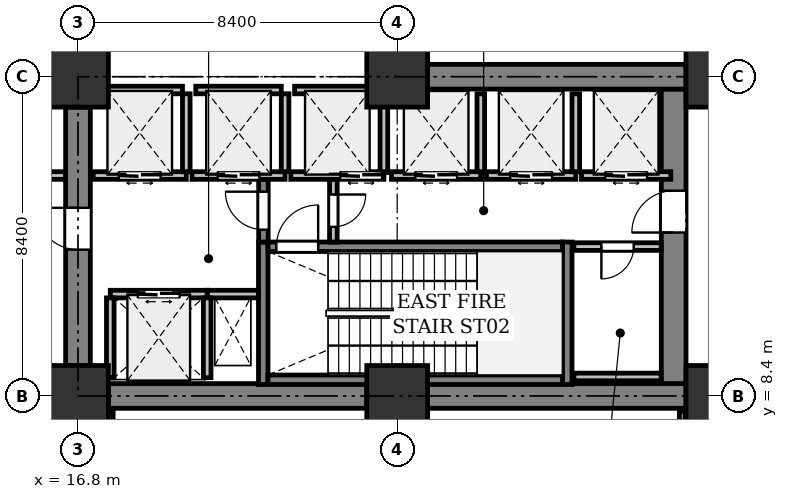
"""IFC4 building model, lengths in metres.
Left out: names, types, materials, properties, quantities, classifications, styles, units other than length and angle.
Written with IfcOpenShell. Run it as: python <this file> out.ifc"""

import sys

from ifc_helpers import new_model, si_unit, direction, frame, frame_2d, origin, origin_2d, place, context, subcontext, project, spatial, rectangle, extrude, element, fill, save


model = new_model("IFC4")
c1 = context("Model", 3, precision=1e-05, world=origin(), true_north=direction((0.0, 1.0)))
c2 = subcontext(c1, "Body", "Model", "MODEL_VIEW")
j1 = project(units=[si_unit("LENGTHUNIT", "METRE"), si_unit("PLANEANGLEUNIT", "RADIAN")], contexts=[c1])
p1 = place(None, origin())
s1 = spatial("IfcSite", under=j1, at=p1, CompositionType="ELEMENT")
p2 = place(p1, origin())
s2 = spatial("IfcBuilding", under=s1, at=p2, CompositionType="ELEMENT")
p3 = place(p2, origin())
s3 = spatial("IfcBuildingStorey", under=s2, at=p3, CompositionType="ELEMENT", Elevation=0.0)
for number, where, z_axis, x_axis in (
    (1, (16.8, 8.4, 0.0), (0.0, 0.0, 1.0), (1.0, 0.0, 0.0)),
    (2, (16.8, 16.8, 0.0), (0.0, 0.0, 1.0), (1.0, 0.0, 0.0)),
    (3, (25.2, 8.4, 0.0), (0.0, 0.0, 1.0), (1.0, 0.0, 0.0)),
    (4, (25.2, 16.8, 0.0), (0.0, 0.0, 1.0), (1.0, 0.0, 0.0)),
    (5, (33.6, 8.4, 0.0), (0.0, 0.0, 1.0), (1.0, 0.0, 0.0)),
    (6, (33.6, 16.8, 0.0), (0.0, 0.0, 1.0), (1.0, 0.0, 0.0)),
):
    element("IfcColumn", number, at=place(p3, frame(where, z_axis=z_axis, x_axis=x_axis)), inside=s3, PredefinedType="COLUMN", context=c2, shape_type="SweptSolid", body=[
        extrude(rectangle(XDim=1.6, YDim=1.6, at=origin_2d()), origin(), (0.0, 0.0, 1.0), 5.4),
    ])
p4 = place(p3, frame((17.6, 8.4, 0.0), z_axis=(0.0, 0.0, 1.0), x_axis=(1.0, 0.0, 0.0)))
e7 = element("IfcWall", 7, at=p4, inside=s3, PredefinedType="SHEAR", context=c2, shape_type="SweptSolid", body=[
    extrude(rectangle(XDim=6.8, YDim=0.65, at=frame_2d((3.4, 0.0))), origin(), (0.0, 0.0, 1.0), 5.125),
])
p5 = place(p3, frame((26.0, 8.4, 0.0), z_axis=(0.0, 0.0, 1.0), x_axis=(1.0, 0.0, 0.0)))
e8 = element("IfcWall", 8, at=p5, inside=s3, PredefinedType="SHEAR", context=c2, shape_type="SweptSolid", body=[
    extrude(rectangle(XDim=6.8, YDim=0.65, at=frame_2d((3.4, 0.0))), origin(), (0.0, 0.0, 1.0), 5.125),
])
p6 = place(p3, frame((32.475, 8.725, 0.0), z_axis=(0.0, 0.0, 1.0), x_axis=(0.0, 1.0, 0.0)))
e9 = element("IfcWall", 9, at=p6, inside=s3, PredefinedType="SHEAR", context=c2, shape_type="SweptSolid", body=[
    extrude(rectangle(XDim=7.75, YDim=0.65, at=frame_2d((3.875, 0.0))), origin(), (0.0, 0.0, 1.0), 5.125),
])
p7 = place(p6, frame((3.975, 0.0, 0.0)))
e10 = element("IfcOpeningElement", 10, at=p7, cuts=e9, PredefinedType="OPENING", context=c2, shape_type="SweptSolid", body=[
    extrude(rectangle(XDim=1.1, YDim=2.15, at=frame_2d((0.55, 1.075))), frame((0.0, 0.335, 0.0), z_axis=(0.0, -1.0, 0.0), x_axis=(1.0, 0.0, 0.0)), (0.0, 0.0, 1.0), 0.67),
])
p8 = place(p3, frame((16.8, 9.2, 0.0), z_axis=(0.0, 0.0, 1.0), x_axis=(0.0, 1.0, 0.0)))
e11 = element("IfcWall", 11, at=p8, inside=s3, PredefinedType="SHEAR", context=c2, shape_type="SweptSolid", body=[
    extrude(rectangle(XDim=6.8, YDim=0.65, at=frame_2d((3.4, 0.0))), origin(), (0.0, 0.0, 1.0), 5.125),
])
p9 = place(p8, frame((3.05, 0.0, 0.0)))
e12 = element("IfcOpeningElement", 12, at=p9, cuts=e11, PredefinedType="OPENING", context=c2, shape_type="SweptSolid", body=[
    extrude(rectangle(XDim=1.1, YDim=2.15, at=frame_2d((0.55, 1.075))), frame((0.0, 0.335, 0.0), z_axis=(0.0, -1.0, 0.0), x_axis=(1.0, 0.0, 0.0)), (0.0, 0.0, 1.0), 0.67),
])
p10 = place(p3, frame((26.0, 16.8, 0.0), z_axis=(0.0, 0.0, 1.0), x_axis=(1.0, 0.0, 0.0)))
e13 = element("IfcWall", 13, at=p10, inside=s3, PredefinedType="SHEAR", context=c2, shape_type="SweptSolid", body=[
    extrude(rectangle(XDim=6.8, YDim=0.65, at=frame_2d((3.4, 0.0))), origin(), (0.0, 0.0, 1.0), 5.125),
])
for number, where, z_axis, x_axis in (
    (14, (21.675, 8.7, 0.0), (0.0, 0.0, 1.0), (0.0, 1.0, 0.0)),
    (15, (29.675, 8.7, 0.0), (0.0, 0.0, 1.0), (0.0, 1.0, 0.0)),
):
    element("IfcWall", number, at=place(p3, frame(where, z_axis=z_axis, x_axis=x_axis)), inside=s3, PredefinedType="SHEAR", context=c2, shape_type="SweptSolid", body=[
        extrude(rectangle(XDim=3.75, YDim=0.25, at=frame_2d((1.875, 0.0))), origin(), (0.0, 0.0, 1.0), 5.125),
    ])
p11 = place(p3, frame((21.8, 8.825, 0.0), z_axis=(0.0, 0.0, 1.0), x_axis=(1.0, 0.0, 0.0)))
e16 = element("IfcWall", 16, at=p11, inside=s3, PredefinedType="SHEAR", context=c2, shape_type="SweptSolid", body=[
    extrude(rectangle(XDim=7.75, YDim=0.25, at=frame_2d((3.875, 0.0))), origin(), (0.0, 0.0, 1.0), 5.125),
])
p12 = place(p3, frame((21.8, 12.325, 0.0), z_axis=(0.0, 0.0, 1.0), x_axis=(1.0, 0.0, 0.0)))
e17 = element("IfcWall", 17, at=p12, inside=s3, PredefinedType="SHEAR", context=c2, shape_type="SweptSolid", body=[
    extrude(rectangle(XDim=7.75, YDim=0.25, at=frame_2d((3.875, 0.0))), origin(), (0.0, 0.0, 1.0), 5.125),
])
p13 = place(p12, frame((0.22, 0.0, 0.0)))
e18 = element("IfcOpeningElement", 18, at=p13, cuts=e17, PredefinedType="OPENING", context=c2, shape_type="SweptSolid", body=[
    extrude(rectangle(XDim=1.1, YDim=2.15, at=frame_2d((0.55, 1.075))), frame((0.0, 0.135, 0.0), z_axis=(0.0, -1.0, 0.0), x_axis=(1.0, 0.0, 0.0)), (0.0, 0.0, 1.0), 0.27),
])
p14 = place(p3, frame((20.2, 11.08, 0.0), z_axis=(0.0, 0.0, 1.0), x_axis=(1.0, 0.0, 0.0)))
e19 = element("IfcWall", 19, at=p14, inside=s3, PredefinedType="PARTITIONING", context=c2, shape_type="SweptSolid", body=[
    extrude(rectangle(XDim=1.35, YDim=0.2, at=frame_2d((0.675, 0.0))), origin(), (0.0, 0.0, 1.0), 5.125),
])
p15 = place(p3, frame((21.68, 12.45, 0.0), z_axis=(0.0, 0.0, 1.0), x_axis=(0.0, 1.0, 0.0)))
e20 = element("IfcWall", 20, at=p15, inside=s3, PredefinedType="SHEAR", context=c2, shape_type="SweptSolid", body=[
    extrude(rectangle(XDim=1.65, YDim=0.25, at=frame_2d((0.825, 0.0))), origin(), (0.0, 0.0, 1.0), 5.125),
])
p16 = place(p15, frame((0.325, 0.0, 0.0)))
e21 = element("IfcOpeningElement", 21, at=p16, cuts=e20, PredefinedType="OPENING", context=c2, shape_type="SweptSolid", body=[
    extrude(rectangle(XDim=1.0, YDim=2.15, at=frame_2d((0.5, 1.075))), frame((0.0, 0.135, 0.0), z_axis=(0.0, -1.0, 0.0), x_axis=(1.0, 0.0, 0.0)), (0.0, 0.0, 1.0), 0.27),
])
p17 = place(p3, frame((23.52, 14.1, 0.0), z_axis=(0.0, 0.0, 1.0), x_axis=(0.0, -1.0, 0.0)))
e22 = element("IfcWall", 22, at=p17, inside=s3, PredefinedType="PARTITIONING", context=c2, shape_type="SweptSolid", body=[
    extrude(rectangle(XDim=1.65, YDim=0.2, at=frame_2d((0.825, 0.0))), origin(), (0.0, 0.0, 1.0), 5.125),
])
p18 = place(p17, frame((0.4, 0.0, 0.0)))
e23 = element("IfcOpeningElement", 23, at=p18, cuts=e22, PredefinedType="OPENING", context=c2, shape_type="SweptSolid", body=[
    extrude(rectangle(XDim=0.85, YDim=2.15, at=frame_2d((0.425, 1.075))), frame((0.0, 0.11, 0.0), z_axis=(0.0, -1.0, 0.0), x_axis=(1.0, 0.0, 0.0)), (0.0, 0.0, 1.0), 0.22),
])
p19 = place(p3, frame((17.65, 11.08, 0.0), z_axis=(0.0, 0.0, 1.0), x_axis=(1.0, 0.0, 0.0)))
e24 = element("IfcWall", 24, at=p19, inside=s3, PredefinedType="PARTITIONING", context=c2, shape_type="SweptSolid", body=[
    extrude(rectangle(XDim=2.55, YDim=0.2, at=frame_2d((1.275, 0.0))), origin(), (0.0, 0.0, 1.0), 5.125),
])
p20 = place(p19, frame((0.725, 0.0, 0.0)))
e25 = element("IfcOpeningElement", 25, at=p20, cuts=e24, PredefinedType="OPENING", context=c2, shape_type="SweptSolid", body=[
    extrude(rectangle(XDim=1.1, YDim=2.2, at=frame_2d((0.55, 1.1))), frame((0.0, 0.11, 0.0), z_axis=(0.0, -1.0, 0.0), x_axis=(1.0, 0.0, 0.0)), (0.0, 0.0, 1.0), 0.22),
])
for number, where, z_axis, x_axis in (
    (26, (20.2, 8.88, 0.0), (0.0, 0.0, 1.0), (0.0, 1.0, 0.0)),
    (27, (17.65, 8.88, 0.0), (0.0, 0.0, 1.0), (0.0, 1.0, 0.0)),
):
    element("IfcWall", number, at=place(p3, frame(where, z_axis=z_axis, x_axis=x_axis)), inside=s3, PredefinedType="PARTITIONING", context=c2, shape_type="SweptSolid", body=[
        extrude(rectangle(XDim=2.1, YDim=0.2, at=frame_2d((1.05, 0.0))), origin(), (0.0, 0.0, 1.0), 5.125),
    ])
p21 = place(p3, frame((17.2, 14.2, 0.0), z_axis=(0.0, 0.0, 1.0), x_axis=(1.0, 0.0, 0.0)))
e28 = element("IfcWall", 28, at=p21, inside=s3, PredefinedType="PARTITIONING", context=c2, shape_type="SweptSolid", body=[
    extrude(rectangle(XDim=2.45, YDim=0.2, at=frame_2d((1.225, 0.0))), origin(), (0.0, 0.0, 1.0), 5.125),
])
p22 = place(p21, frame((0.675, 0.0, 0.0)))
e29 = element("IfcOpeningElement", 29, at=p22, cuts=e28, PredefinedType="OPENING", context=c2, shape_type="SweptSolid", body=[
    extrude(rectangle(XDim=1.1, YDim=2.2, at=frame_2d((0.55, 1.1))), frame((0.0, 0.11, 0.0), z_axis=(0.0, -1.0, 0.0), x_axis=(1.0, 0.0, 0.0)), (0.0, 0.0, 1.0), 0.22),
])
p23 = place(p3, frame((19.65, 14.3, 0.0), z_axis=(0.0, 0.0, 1.0), x_axis=(0.0, 1.0, 0.0)))
e30 = element("IfcWall", 30, at=p23, inside=s3, PredefinedType="PARTITIONING", context=c2, shape_type="SweptSolid", body=[
    extrude(rectangle(XDim=2.05, YDim=0.2, at=frame_2d((1.025, 0.0))), origin(), (0.0, 0.0, 1.0), 5.125),
])
p24 = place(p3, frame((17.3, 16.45, 0.0), z_axis=(0.0, 0.0, 1.0), x_axis=(1.0, 0.0, 0.0)))
e31 = element("IfcWall", 31, at=p24, inside=s3, PredefinedType="PARTITIONING", context=c2, shape_type="SweptSolid", body=[
    extrude(rectangle(XDim=2.25, YDim=0.2, at=frame_2d((1.125, 0.0))), origin(), (0.0, 0.0, 1.0), 5.125),
])
p25 = place(p3, frame((19.8, 14.2, 0.0), z_axis=(0.0, 0.0, 1.0), x_axis=(1.0, 0.0, 0.0)))
e32 = element("IfcWall", 32, at=p25, inside=s3, PredefinedType="PARTITIONING", context=c2, shape_type="SweptSolid", body=[
    extrude(rectangle(XDim=2.45, YDim=0.2, at=frame_2d((1.225, 0.0))), origin(), (0.0, 0.0, 1.0), 5.125),
])
p26 = place(p25, frame((0.675, 0.0, 0.0)))
e33 = element("IfcOpeningElement", 33, at=p26, cuts=e32, PredefinedType="OPENING", context=c2, shape_type="SweptSolid", body=[
    extrude(rectangle(XDim=1.1, YDim=2.2, at=frame_2d((0.55, 1.1))), frame((0.0, 0.11, 0.0), z_axis=(0.0, -1.0, 0.0), x_axis=(1.0, 0.0, 0.0)), (0.0, 0.0, 1.0), 0.22),
])
p27 = place(p3, frame((22.25, 14.3, 0.0), z_axis=(0.0, 0.0, 1.0), x_axis=(0.0, 1.0, 0.0)))
e34 = element("IfcWall", 34, at=p27, inside=s3, PredefinedType="PARTITIONING", context=c2, shape_type="SweptSolid", body=[
    extrude(rectangle(XDim=2.05, YDim=0.2, at=frame_2d((1.025, 0.0))), origin(), (0.0, 0.0, 1.0), 5.125),
])
p28 = place(p3, frame((19.9, 16.45, 0.0), z_axis=(0.0, 0.0, 1.0), x_axis=(1.0, 0.0, 0.0)))
e35 = element("IfcWall", 35, at=p28, inside=s3, PredefinedType="PARTITIONING", context=c2, shape_type="SweptSolid", body=[
    extrude(rectangle(XDim=2.25, YDim=0.2, at=frame_2d((1.125, 0.0))), origin(), (0.0, 0.0, 1.0), 5.125),
])
p29 = place(p3, frame((22.4, 14.2, 0.0), z_axis=(0.0, 0.0, 1.0), x_axis=(1.0, 0.0, 0.0)))
e36 = element("IfcWall", 36, at=p29, inside=s3, PredefinedType="PARTITIONING", context=c2, shape_type="SweptSolid", body=[
    extrude(rectangle(XDim=2.45, YDim=0.2, at=frame_2d((1.225, 0.0))), origin(), (0.0, 0.0, 1.0), 5.125),
])
p30 = place(p29, frame((1.3, 0.0, 0.0)))
e37 = element("IfcOpeningElement", 37, at=p30, cuts=e36, PredefinedType="OPENING", context=c2, shape_type="SweptSolid", body=[
    extrude(rectangle(XDim=1.1, YDim=2.2, at=frame_2d((0.55, 1.1))), frame((0.0, 0.11, 0.0), z_axis=(0.0, -1.0, 0.0), x_axis=(1.0, 0.0, 0.0)), (0.0, 0.0, 1.0), 0.22),
])
p31 = place(p3, frame((24.85, 14.3, 0.0), z_axis=(0.0, 0.0, 1.0), x_axis=(0.0, 1.0, 0.0)))
e38 = element("IfcWall", 38, at=p31, inside=s3, PredefinedType="PARTITIONING", context=c2, shape_type="SweptSolid", body=[
    extrude(rectangle(XDim=2.05, YDim=0.2, at=frame_2d((1.025, 0.0))), origin(), (0.0, 0.0, 1.0), 5.125),
])
p32 = place(p3, frame((22.5, 16.45, 0.0), z_axis=(0.0, 0.0, 1.0), x_axis=(1.0, 0.0, 0.0)))
e39 = element("IfcWall", 39, at=p32, inside=s3, PredefinedType="PARTITIONING", context=c2, shape_type="SweptSolid", body=[
    extrude(rectangle(XDim=2.25, YDim=0.2, at=frame_2d((1.125, 0.0))), origin(), (0.0, 0.0, 1.0), 5.125),
])
p33 = place(p3, frame((25.05, 14.2, 0.0), z_axis=(0.0, 0.0, 1.0), x_axis=(1.0, 0.0, 0.0)))
e40 = element("IfcWall", 40, at=p33, inside=s3, PredefinedType="PARTITIONING", context=c2, shape_type="SweptSolid", body=[
    extrude(rectangle(XDim=2.35, YDim=0.2, at=frame_2d((1.175, 0.0))), origin(), (0.0, 0.0, 1.0), 5.125),
])
p34 = place(p33, frame((0.625, 0.0, 0.0)))
e41 = element("IfcOpeningElement", 41, at=p34, cuts=e40, PredefinedType="OPENING", context=c2, shape_type="SweptSolid", body=[
    extrude(rectangle(XDim=1.1, YDim=2.2, at=frame_2d((0.55, 1.1))), frame((0.0, 0.11, 0.0), z_axis=(0.0, -1.0, 0.0), x_axis=(1.0, 0.0, 0.0)), (0.0, 0.0, 1.0), 0.22),
])
p35 = place(p3, frame((27.4, 14.3, 0.0), z_axis=(0.0, 0.0, 1.0), x_axis=(0.0, 1.0, 0.0)))
e42 = element("IfcWall", 42, at=p35, inside=s3, PredefinedType="PARTITIONING", context=c2, shape_type="SweptSolid", body=[
    extrude(rectangle(XDim=2.05, YDim=0.2, at=frame_2d((1.025, 0.0))), origin(), (0.0, 0.0, 1.0), 5.125),
])
p36 = place(p3, frame((27.55, 14.2, 0.0), z_axis=(0.0, 0.0, 1.0), x_axis=(1.0, 0.0, 0.0)))
e43 = element("IfcWall", 43, at=p36, inside=s3, PredefinedType="PARTITIONING", context=c2, shape_type="SweptSolid", body=[
    extrude(rectangle(XDim=2.35, YDim=0.2, at=frame_2d((1.175, 0.0))), origin(), (0.0, 0.0, 1.0), 5.125),
])
p37 = place(p36, frame((0.625, 0.0, 0.0)))
e44 = element("IfcOpeningElement", 44, at=p37, cuts=e43, PredefinedType="OPENING", context=c2, shape_type="SweptSolid", body=[
    extrude(rectangle(XDim=1.1, YDim=2.2, at=frame_2d((0.55, 1.1))), frame((0.0, 0.11, 0.0), z_axis=(0.0, -1.0, 0.0), x_axis=(1.0, 0.0, 0.0)), (0.0, 0.0, 1.0), 0.22),
])
p38 = place(p3, frame((29.9, 14.3, 0.0), z_axis=(0.0, 0.0, 1.0), x_axis=(0.0, 1.0, 0.0)))
e45 = element("IfcWall", 45, at=p38, inside=s3, PredefinedType="PARTITIONING", context=c2, shape_type="SweptSolid", body=[
    extrude(rectangle(XDim=2.05, YDim=0.2, at=frame_2d((1.025, 0.0))), origin(), (0.0, 0.0, 1.0), 5.125),
])
p39 = place(p3, frame((30.05, 14.2, 0.0), z_axis=(0.0, 0.0, 1.0), x_axis=(1.0, 0.0, 0.0)))
e46 = element("IfcWall", 46, at=p39, inside=s3, PredefinedType="PARTITIONING", context=c2, shape_type="SweptSolid", body=[
    extrude(rectangle(XDim=2.35, YDim=0.2, at=frame_2d((1.175, 0.0))), origin(), (0.0, 0.0, 1.0), 5.125),
])
p40 = place(p39, frame((0.625, 0.0, 0.0)))
e47 = element("IfcOpeningElement", 47, at=p40, cuts=e46, PredefinedType="OPENING", context=c2, shape_type="SweptSolid", body=[
    extrude(rectangle(XDim=1.1, YDim=2.2, at=frame_2d((0.55, 1.1))), frame((0.0, 0.11, 0.0), z_axis=(0.0, -1.0, 0.0), x_axis=(1.0, 0.0, 0.0)), (0.0, 0.0, 1.0), 0.22),
])
p41 = place(p3, frame((16.471, 14.2, 0.0), z_axis=(0.0, 0.0, 1.0), x_axis=(-1.0, 0.0, 0.0)))
e48 = element("IfcWall", 48, at=p41, inside=s3, PredefinedType="PARTITIONING", context=c2, shape_type="SweptSolid", body=[
    extrude(rectangle(XDim=2.621, YDim=0.2, at=frame_2d((1.311, 0.0))), origin(), (0.0, 0.0, 1.0), 5.125),
])
p42 = place(p3, frame((32.146, 12.33, 0.0), z_axis=(0.0, 0.0, 1.0), x_axis=(-1.0, 0.0, 0.0)))
e49 = element("IfcWall", 49, at=p42, inside=s3, PredefinedType="PARTITIONING", context=c2, shape_type="SweptSolid", body=[
    extrude(rectangle(XDim=2.296, YDim=0.2, at=frame_2d((1.148, 0.0))), origin(), (0.0, 0.0, 1.0), 5.125),
])
p43 = place(p42, frame((0.723, 0.0, 0.0)))
e50 = element("IfcOpeningElement", 50, at=p43, cuts=e49, PredefinedType="OPENING", context=c2, shape_type="SweptSolid", body=[
    extrude(rectangle(XDim=0.85, YDim=2.15, at=frame_2d((0.425, 1.075))), frame((0.0, 0.11, 0.0), z_axis=(0.0, -1.0, 0.0), x_axis=(1.0, 0.0, 0.0)), (0.0, 0.0, 1.0), 0.22),
])
p44 = place(p3, frame((29.85, 8.9, 0.0), z_axis=(0.0, 0.0, 1.0), x_axis=(1.0, 0.0, 0.0)))
e51 = element("IfcWall", 51, at=p44, inside=s3, PredefinedType="PARTITIONING", context=c2, shape_type="SweptSolid", body=[
    extrude(rectangle(XDim=2.296, YDim=0.2, at=frame_2d((1.148, 0.0))), origin(), (0.0, 0.0, 1.0), 5.125),
])
p45 = place(p3, frame((17.65, 8.0, 0.0), z_axis=(0.0, 0.0, 1.0), x_axis=(0.0, -1.0, 0.0)))
e52 = element("IfcWall", 52, at=p45, inside=s3, PredefinedType="PARTITIONING", context=c2, shape_type="SweptSolid", body=[
    extrude(rectangle(XDim=7.856, YDim=0.15, at=frame_2d((3.928, 0.0))), origin(), (0.0, 0.0, 1.0), 5.125),
])
p46 = place(p3, frame((32.7, 0.144, 0.0), z_axis=(0.0, 0.0, 1.0), x_axis=(0.0, 1.0, 0.0)))
e53 = element("IfcWall", 53, at=p46, inside=s3, PredefinedType="PARTITIONING", context=c2, shape_type="SweptSolid", body=[
    extrude(rectangle(XDim=7.856, YDim=0.15, at=frame_2d((3.928, 0.0))), origin(), (0.0, 0.0, 1.0), 5.125),
])
p47 = place(p46, frame((4.71, 0.0, 0.0)))
e54 = element("IfcOpeningElement", 54, at=p47, cuts=e53, PredefinedType="OPENING", context=c2, shape_type="SweptSolid", body=[
    extrude(rectangle(XDim=0.95, YDim=2.15, at=frame_2d((0.475, 1.075))), frame((0.0, 0.085, 0.0), z_axis=(0.0, -1.0, 0.0), x_axis=(1.0, 0.0, 0.0)), (0.0, 0.0, 1.0), 0.17),
])
p48 = place(p7, origin())
e55 = element("IfcDoor", 55, at=p48, inside=s3, OperationType="SINGLE_SWING_LEFT", PredefinedType="DOOR", context=c2, shape_type="SweptSolid", body=[
    extrude(rectangle(XDim=1.1, YDim=2.15, at=frame_2d((0.55, 1.075))), frame((0.0, 0.025, 0.0), z_axis=(0.0, -1.0, 0.0), x_axis=(1.0, 0.0, 0.0)), (0.0, 0.0, 1.0), 0.05),
])
fill(e10, e55)
p49 = place(p9, origin())
e56 = element("IfcDoor", 56, at=p49, inside=s3, OperationType="SINGLE_SWING_RIGHT", PredefinedType="DOOR", context=c2, shape_type="SweptSolid", body=[
    extrude(rectangle(XDim=1.1, YDim=2.15, at=frame_2d((0.55, 1.075))), frame((0.0, 0.025, 0.0), z_axis=(0.0, -1.0, 0.0), x_axis=(1.0, 0.0, 0.0)), (0.0, 0.0, 1.0), 0.05),
])
fill(e12, e56)
p50 = place(p13, origin())
e57 = element("IfcDoor", 57, at=p50, inside=s3, OperationType="SINGLE_SWING_RIGHT", PredefinedType="DOOR", context=c2, shape_type="SweptSolid", body=[
    extrude(rectangle(XDim=1.1, YDim=2.15, at=frame_2d((0.55, 1.075))), frame((0.0, 0.025, 0.0), z_axis=(0.0, -1.0, 0.0), x_axis=(1.0, 0.0, 0.0)), (0.0, 0.0, 1.0), 0.05),
])
fill(e18, e57)
p51 = place(p16, origin())
e58 = element("IfcDoor", 58, at=p51, inside=s3, OperationType="SINGLE_SWING_RIGHT", PredefinedType="DOOR", context=c2, shape_type="SweptSolid", body=[
    extrude(rectangle(XDim=1.0, YDim=2.15, at=frame_2d((0.5, 1.075))), frame((0.0, 0.025, 0.0), z_axis=(0.0, -1.0, 0.0), x_axis=(1.0, 0.0, 0.0)), (0.0, 0.0, 1.0), 0.05),
])
fill(e21, e58)
p52 = place(p18, origin())
e59 = element("IfcDoor", 59, at=p52, inside=s3, OperationType="SINGLE_SWING_LEFT", PredefinedType="DOOR", context=c2, shape_type="SweptSolid", body=[
    extrude(rectangle(XDim=0.85, YDim=2.15, at=frame_2d((0.425, 1.075))), frame((0.0, 0.025, 0.0), z_axis=(0.0, -1.0, 0.0), x_axis=(1.0, 0.0, 0.0)), (0.0, 0.0, 1.0), 0.05),
])
fill(e23, e59)
p53 = place(p20, origin())
e60 = element("IfcDoor", 60, at=p53, inside=s3, OperationType="DOUBLE_DOOR_SLIDING", PredefinedType="DOOR", context=c2, shape_type="SweptSolid", body=[
    extrude(rectangle(XDim=1.1, YDim=2.2, at=frame_2d((0.55, 1.1))), frame((0.0, 0.025, 0.0), z_axis=(0.0, -1.0, 0.0), x_axis=(1.0, 0.0, 0.0)), (0.0, 0.0, 1.0), 0.05),
])
fill(e25, e60)
p54 = place(p22, origin())
e61 = element("IfcDoor", 61, at=p54, inside=s3, OperationType="DOUBLE_DOOR_SLIDING", PredefinedType="DOOR", context=c2, shape_type="SweptSolid", body=[
    extrude(rectangle(XDim=1.1, YDim=2.2, at=frame_2d((0.55, 1.1))), frame((0.0, 0.025, 0.0), z_axis=(0.0, -1.0, 0.0), x_axis=(1.0, 0.0, 0.0)), (0.0, 0.0, 1.0), 0.05),
])
fill(e29, e61)
p55 = place(p26, origin())
e62 = element("IfcDoor", 62, at=p55, inside=s3, OperationType="DOUBLE_DOOR_SLIDING", PredefinedType="DOOR", context=c2, shape_type="SweptSolid", body=[
    extrude(rectangle(XDim=1.1, YDim=2.2, at=frame_2d((0.55, 1.1))), frame((0.0, 0.025, 0.0), z_axis=(0.0, -1.0, 0.0), x_axis=(1.0, 0.0, 0.0)), (0.0, 0.0, 1.0), 0.05),
])
fill(e33, e62)
p56 = place(p30, origin())
e63 = element("IfcDoor", 63, at=p56, inside=s3, OperationType="DOUBLE_DOOR_SLIDING", PredefinedType="DOOR", context=c2, shape_type="SweptSolid", body=[
    extrude(rectangle(XDim=1.1, YDim=2.2, at=frame_2d((0.55, 1.1))), frame((0.0, 0.025, 0.0), z_axis=(0.0, -1.0, 0.0), x_axis=(1.0, 0.0, 0.0)), (0.0, 0.0, 1.0), 0.05),
])
fill(e37, e63)
p57 = place(p34, origin())
e64 = element("IfcDoor", 64, at=p57, inside=s3, OperationType="DOUBLE_DOOR_SLIDING", PredefinedType="DOOR", context=c2, shape_type="SweptSolid", body=[
    extrude(rectangle(XDim=1.1, YDim=2.2, at=frame_2d((0.55, 1.1))), frame((0.0, 0.025, 0.0), z_axis=(0.0, -1.0, 0.0), x_axis=(1.0, 0.0, 0.0)), (0.0, 0.0, 1.0), 0.05),
])
fill(e41, e64)
p58 = place(p37, origin())
e65 = element("IfcDoor", 65, at=p58, inside=s3, OperationType="DOUBLE_DOOR_SLIDING", PredefinedType="DOOR", context=c2, shape_type="SweptSolid", body=[
    extrude(rectangle(XDim=1.1, YDim=2.2, at=frame_2d((0.55, 1.1))), frame((0.0, 0.025, 0.0), z_axis=(0.0, -1.0, 0.0), x_axis=(1.0, 0.0, 0.0)), (0.0, 0.0, 1.0), 0.05),
])
fill(e44, e65)
p59 = place(p40, origin())
e66 = element("IfcDoor", 66, at=p59, inside=s3, OperationType="DOUBLE_DOOR_SLIDING", PredefinedType="DOOR", context=c2, shape_type="SweptSolid", body=[
    extrude(rectangle(XDim=1.1, YDim=2.2, at=frame_2d((0.55, 1.1))), frame((0.0, 0.025, 0.0), z_axis=(0.0, -1.0, 0.0), x_axis=(1.0, 0.0, 0.0)), (0.0, 0.0, 1.0), 0.05),
])
fill(e47, e66)
p60 = place(p43, origin())
e67 = element("IfcDoor", 67, at=p60, inside=s3, OperationType="SINGLE_SWING_RIGHT", PredefinedType="DOOR", context=c2, shape_type="SweptSolid", body=[
    extrude(rectangle(XDim=0.85, YDim=2.15, at=frame_2d((0.425, 1.075))), frame((0.0, 0.025, 0.0), z_axis=(0.0, -1.0, 0.0), x_axis=(1.0, 0.0, 0.0)), (0.0, 0.0, 1.0), 0.05),
])
fill(e50, e67)
save(model, sys.argv[1])
